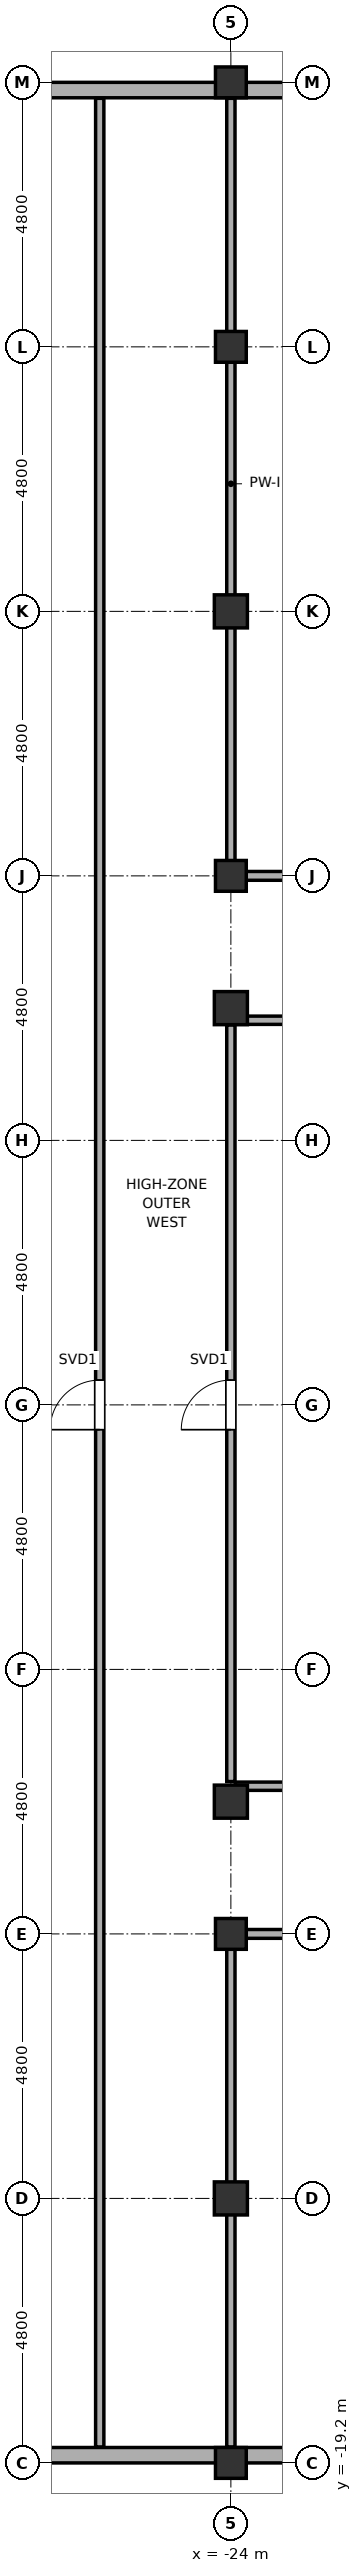
"""IFC4 building model, lengths in metres.
Left out: names, types, materials, properties, quantities, classifications, styles, units other than length and angle.
Written with IfcOpenShell. Run it as: python <this file> out.ifc"""

import sys

from ifc_helpers import new_model, si_unit, direction, frame, frame_2d, origin, origin_2d, place, context, subcontext, project, spatial, rectangle, hollow_rectangle, hollow_circle, extrude, element, fill, save


model = new_model("IFC4")
c1 = context("Model", 3, precision=1e-05, world=origin(), true_north=direction((0.0, 1.0)))
c2 = subcontext(c1, "Body", "Model", "MODEL_VIEW")
j1 = project(units=[si_unit("LENGTHUNIT", "METRE"), si_unit("PLANEANGLEUNIT", "RADIAN")], contexts=[c1])
p1 = place(None, origin())
s1 = spatial("IfcSite", under=j1, at=p1, CompositionType="ELEMENT")
p2 = place(p1, origin())
s2 = spatial("IfcBuilding", under=s1, at=p2, CompositionType="ELEMENT")
p3 = place(p2, frame((0.0, 0.0, 249.25)))
s3 = spatial("IfcBuildingStorey", under=s2, at=p3, CompositionType="ELEMENT", Elevation=249.25)
p4 = place(p3, frame((-24.0, -19.2, 0.0), z_axis=(0.0, 0.0, 1.0), x_axis=(1.0, 0.0, 0.0)))
e1 = element("IfcColumn", 1, at=p4, inside=s3, PredefinedType="COLUMN", context=c2, shape_type="SweptSolid", body=[
    extrude(hollow_circle(Radius=0.28, WallThickness=0.025, at=origin_2d()), origin(), (0.0, 0.0, 1.0), 3.85),
])
p5 = place(p3, frame((-24.0, -14.4, 0.0), z_axis=(0.0, 0.0, 1.0), x_axis=(1.0, 0.0, 0.0)))
e2 = element("IfcColumn", 2, at=p5, inside=s3, PredefinedType="COLUMN", context=c2, shape_type="SweptSolid", body=[
    extrude(hollow_rectangle(XDim=0.6, YDim=0.6, WallThickness=0.028, at=origin_2d()), origin(), (0.0, 0.0, 1.0), 3.85),
])
p6 = place(p3, frame((-24.0, -9.6, 0.0), z_axis=(0.0, 0.0, 1.0), x_axis=(1.0, 0.0, 0.0)))
e3 = element("IfcColumn", 3, at=p6, inside=s3, PredefinedType="COLUMN", context=c2, shape_type="SweptSolid", body=[
    extrude(hollow_circle(Radius=0.28, WallThickness=0.025, at=origin_2d()), origin(), (0.0, 0.0, 1.0), 3.85),
])
for number, where, z_axis, x_axis in (
    (4, (-24.0, -7.2, 0.0), (0.0, 0.0, 1.0), (1.0, 0.0, 0.0)),
    (5, (-24.0, 7.2, 0.0), (0.0, 0.0, 1.0), (1.0, 0.0, 0.0)),
):
    element("IfcColumn", number, at=place(p3, frame(where, z_axis=z_axis, x_axis=x_axis)), inside=s3, PredefinedType="COLUMN", context=c2, shape_type="SweptSolid", body=[
        extrude(hollow_rectangle(XDim=0.6, YDim=0.6, WallThickness=0.028, at=origin_2d()), origin(), (0.0, 0.0, 1.0), 3.85),
    ])
p7 = place(p3, frame((-24.0, 9.6, 0.0), z_axis=(0.0, 0.0, 1.0), x_axis=(1.0, 0.0, 0.0)))
e6 = element("IfcColumn", 6, at=p7, inside=s3, PredefinedType="COLUMN", context=c2, shape_type="SweptSolid", body=[
    extrude(hollow_circle(Radius=0.28, WallThickness=0.025, at=origin_2d()), origin(), (0.0, 0.0, 1.0), 3.85),
])
p8 = place(p3, frame((-24.0, 14.4, 0.0), z_axis=(0.0, 0.0, 1.0), x_axis=(1.0, 0.0, 0.0)))
e7 = element("IfcColumn", 7, at=p8, inside=s3, PredefinedType="COLUMN", context=c2, shape_type="SweptSolid", body=[
    extrude(hollow_rectangle(XDim=0.6, YDim=0.6, WallThickness=0.028, at=origin_2d()), origin(), (0.0, 0.0, 1.0), 3.85),
])
for number, where, z_axis, x_axis in (
    (8, (-24.0, 19.2, 0.0), (0.0, 0.0, 1.0), (1.0, 0.0, 0.0)),
    (9, (-24.0, 24.0, 0.0), (0.0, 0.0, 1.0), (1.0, 0.0, 0.0)),
):
    element("IfcColumn", number, at=place(p3, frame(where, z_axis=z_axis, x_axis=x_axis)), inside=s3, PredefinedType="COLUMN", context=c2, shape_type="SweptSolid", body=[
        extrude(hollow_circle(Radius=0.28, WallThickness=0.025, at=origin_2d()), origin(), (0.0, 0.0, 1.0), 3.85),
    ])
p9 = place(p3, frame((-30.0, -19.06, 0.0), z_axis=(0.0, 0.0, 1.0), x_axis=(1.0, 0.0, 0.0)))
e10 = element("IfcWall", 10, at=p9, inside=s3, PredefinedType="SOLIDWALL", context=c2, shape_type="SweptSolid", body=[
    extrude(rectangle(XDim=25.25, YDim=0.28, at=frame_2d((12.625, 0.0))), origin(), (0.0, 0.0, 1.0), 2.27),
])
p10 = place(p9, frame((7.8, 0.0, 0.75)))
e11 = element("IfcOpeningElement", 11, at=p10, cuts=e10, PredefinedType="OPENING", context=c2, shape_type="SweptSolid", body=[
    extrude(rectangle(XDim=1.2, YDim=1.15, at=frame_2d((0.6, 0.575))), frame((0.0, 0.155, 0.0), z_axis=(0.0, -1.0, 0.0), x_axis=(1.0, 0.0, 0.0)), (0.0, 0.0, 1.0), 0.31),
])
p11 = place(p9, frame((12.6, 0.0, 0.75)))
e12 = element("IfcOpeningElement", 12, at=p11, cuts=e10, PredefinedType="OPENING", context=c2, shape_type="SweptSolid", body=[
    extrude(rectangle(XDim=1.2, YDim=1.15, at=frame_2d((0.6, 0.575))), frame((0.0, 0.155, 0.0), z_axis=(0.0, -1.0, 0.0), x_axis=(1.0, 0.0, 0.0)), (0.0, 0.0, 1.0), 0.31),
])
p12 = place(p9, frame((17.4, 0.0, 0.75)))
e13 = element("IfcOpeningElement", 13, at=p12, cuts=e10, PredefinedType="OPENING", context=c2, shape_type="SweptSolid", body=[
    extrude(rectangle(XDim=1.2, YDim=1.15, at=frame_2d((0.6, 0.575))), frame((0.0, 0.155, 0.0), z_axis=(0.0, -1.0, 0.0), x_axis=(1.0, 0.0, 0.0)), (0.0, 0.0, 1.0), 0.31),
])
p13 = place(p9, frame((22.2, 0.0, 0.75)))
e14 = element("IfcOpeningElement", 14, at=p13, cuts=e10, PredefinedType="OPENING", context=c2, shape_type="SweptSolid", body=[
    extrude(rectangle(XDim=1.2, YDim=1.15, at=frame_2d((0.6, 0.575))), frame((0.0, 0.155, 0.0), z_axis=(0.0, -1.0, 0.0), x_axis=(1.0, 0.0, 0.0)), (0.0, 0.0, 1.0), 0.31),
])
p14 = place(p3, frame((-30.0, 23.86, 0.0), z_axis=(0.0, 0.0, 1.0), x_axis=(1.0, 0.0, 0.0)))
e15 = element("IfcWall", 15, at=p14, inside=s3, PredefinedType="SOLIDWALL", context=c2, shape_type="SweptSolid", body=[
    extrude(rectangle(XDim=25.25, YDim=0.28, at=frame_2d((12.625, 0.0))), origin(), (0.0, 0.0, 1.0), 2.27),
])
p15 = place(p14, frame((7.8, 0.0, 0.75)))
e16 = element("IfcOpeningElement", 16, at=p15, cuts=e15, PredefinedType="OPENING", context=c2, shape_type="SweptSolid", body=[
    extrude(rectangle(XDim=1.2, YDim=1.15, at=frame_2d((0.6, 0.575))), frame((0.0, 0.155, 0.0), z_axis=(0.0, -1.0, 0.0), x_axis=(1.0, 0.0, 0.0)), (0.0, 0.0, 1.0), 0.31),
])
p16 = place(p14, frame((13.8, 0.0, 0.75)))
e17 = element("IfcOpeningElement", 17, at=p16, cuts=e15, PredefinedType="OPENING", context=c2, shape_type="SweptSolid", body=[
    extrude(rectangle(XDim=1.2, YDim=1.15, at=frame_2d((0.6, 0.575))), frame((0.0, 0.155, 0.0), z_axis=(0.0, -1.0, 0.0), x_axis=(1.0, 0.0, 0.0)), (0.0, 0.0, 1.0), 0.31),
])
p17 = place(p14, frame((17.4, 0.0, 0.75)))
e18 = element("IfcOpeningElement", 18, at=p17, cuts=e15, PredefinedType="OPENING", context=c2, shape_type="SweptSolid", body=[
    extrude(rectangle(XDim=1.2, YDim=1.15, at=frame_2d((0.6, 0.575))), frame((0.0, 0.155, 0.0), z_axis=(0.0, -1.0, 0.0), x_axis=(1.0, 0.0, 0.0)), (0.0, 0.0, 1.0), 0.31),
])
p18 = place(p14, frame((22.2, 0.0, 0.75)))
e19 = element("IfcOpeningElement", 19, at=p18, cuts=e15, PredefinedType="OPENING", context=c2, shape_type="SweptSolid", body=[
    extrude(rectangle(XDim=1.2, YDim=1.15, at=frame_2d((0.6, 0.575))), frame((0.0, 0.155, 0.0), z_axis=(0.0, -1.0, 0.0), x_axis=(1.0, 0.0, 0.0)), (0.0, 0.0, 1.0), 0.31),
])
p19 = place(p3, frame((-23.92, -9.6, 0.0), z_axis=(0.0, 0.0, 1.0), x_axis=(1.0, 0.0, 0.0)))
e20 = element("IfcWall", 20, at=p19, inside=s3, PredefinedType="PARTITIONING", context=c2, shape_type="SweptSolid", body=[
    extrude(rectangle(XDim=47.84, YDim=0.16, at=frame_2d((23.92, 0.0))), origin(), (0.0, 0.0, 1.0), 2.27),
])
p20 = place(p19, frame((1.87, 0.0, 0.0)))
e21 = element("IfcOpeningElement", 21, at=p20, cuts=e20, PredefinedType="OPENING", context=c2, shape_type="SweptSolid", body=[
    extrude(rectangle(XDim=0.9, YDim=2.1, at=frame_2d((0.45, 1.05))), frame((0.0, 0.095, 0.0), z_axis=(0.0, -1.0, 0.0), x_axis=(1.0, 0.0, 0.0)), (0.0, 0.0, 1.0), 0.19),
])
p21 = place(p19, frame((45.07, 0.0, 0.0)))
e22 = element("IfcOpeningElement", 22, at=p21, cuts=e20, PredefinedType="OPENING", context=c2, shape_type="SweptSolid", body=[
    extrude(rectangle(XDim=0.9, YDim=2.1, at=frame_2d((0.45, 1.05))), frame((0.0, 0.095, 0.0), z_axis=(0.0, -1.0, 0.0), x_axis=(1.0, 0.0, 0.0)), (0.0, 0.0, 1.0), 0.19),
])
p22 = place(p19, frame((6.67, 0.0, 0.0)))
e23 = element("IfcOpeningElement", 23, at=p22, cuts=e20, PredefinedType="OPENING", context=c2, shape_type="SweptSolid", body=[
    extrude(rectangle(XDim=0.9, YDim=2.1, at=frame_2d((0.45, 1.05))), frame((0.0, 0.095, 0.0), z_axis=(0.0, -1.0, 0.0), x_axis=(1.0, 0.0, 0.0)), (0.0, 0.0, 1.0), 0.19),
])
p23 = place(p19, frame((11.47, 0.0, 0.0)))
e24 = element("IfcOpeningElement", 24, at=p23, cuts=e20, PredefinedType="OPENING", context=c2, shape_type="SweptSolid", body=[
    extrude(rectangle(XDim=0.9, YDim=2.1, at=frame_2d((0.45, 1.05))), frame((0.0, 0.095, 0.0), z_axis=(0.0, -1.0, 0.0), x_axis=(1.0, 0.0, 0.0)), (0.0, 0.0, 1.0), 0.19),
])
p24 = place(p19, frame((16.27, 0.0, 0.0)))
e25 = element("IfcOpeningElement", 25, at=p24, cuts=e20, PredefinedType="OPENING", context=c2, shape_type="SweptSolid", body=[
    extrude(rectangle(XDim=0.9, YDim=2.1, at=frame_2d((0.45, 1.05))), frame((0.0, 0.095, 0.0), z_axis=(0.0, -1.0, 0.0), x_axis=(1.0, 0.0, 0.0)), (0.0, 0.0, 1.0), 0.19),
])
p25 = place(p19, frame((21.07, 0.0, 0.0)))
e26 = element("IfcOpeningElement", 26, at=p25, cuts=e20, PredefinedType="OPENING", context=c2, shape_type="SweptSolid", body=[
    extrude(rectangle(XDim=0.9, YDim=2.1, at=frame_2d((0.45, 1.05))), frame((0.0, 0.095, 0.0), z_axis=(0.0, -1.0, 0.0), x_axis=(1.0, 0.0, 0.0)), (0.0, 0.0, 1.0), 0.19),
])
p26 = place(p19, frame((25.87, 0.0, 0.0)))
e27 = element("IfcOpeningElement", 27, at=p26, cuts=e20, PredefinedType="OPENING", context=c2, shape_type="SweptSolid", body=[
    extrude(rectangle(XDim=0.9, YDim=2.1, at=frame_2d((0.45, 1.05))), frame((0.0, 0.095, 0.0), z_axis=(0.0, -1.0, 0.0), x_axis=(1.0, 0.0, 0.0)), (0.0, 0.0, 1.0), 0.19),
])
p27 = place(p19, frame((30.635, 0.0, 0.0)))
e28 = element("IfcOpeningElement", 28, at=p27, cuts=e20, PredefinedType="OPENING", context=c2, shape_type="SweptSolid", body=[
    extrude(rectangle(XDim=1.05, YDim=2.2, at=frame_2d((0.525, 1.1))), frame((0.0, 0.095, 0.0), z_axis=(0.0, -1.0, 0.0), x_axis=(1.0, 0.0, 0.0)), (0.0, 0.0, 1.0), 0.19),
])
p28 = place(p19, frame((40.83, 0.0, 0.0)))
e29 = element("IfcOpeningElement", 29, at=p28, cuts=e20, PredefinedType="OPENING", context=c2, shape_type="SweptSolid", body=[
    extrude(rectangle(XDim=0.92, YDim=2.15, at=frame_2d((0.46, 1.075))), frame((0.0, 0.095, 0.0), z_axis=(0.0, -1.0, 0.0), x_axis=(1.0, 0.0, 0.0)), (0.0, 0.0, 1.0), 0.19),
])
for number, where, z_axis, x_axis in (
    (30, (-23.92, -6.92, 0.0), (0.0, 0.0, 1.0), (1.0, 0.0, 0.0)),
    (31, (-23.92, 6.98, 0.0), (0.0, 0.0, 1.0), (1.0, 0.0, 0.0)),
):
    element("IfcWall", number, at=place(p3, frame(where, z_axis=z_axis, x_axis=x_axis)), inside=s3, PredefinedType="PARTITIONING", context=c2, shape_type="SweptSolid", body=[
        extrude(rectangle(XDim=9.4, YDim=0.15, at=frame_2d((4.7, 0.0))), origin(), (0.0, 0.0, 1.0), 2.27),
    ])
p29 = place(p3, frame((-23.92, 9.6, 0.0), z_axis=(0.0, 0.0, 1.0), x_axis=(1.0, 0.0, 0.0)))
e32 = element("IfcWall", 32, at=p29, inside=s3, PredefinedType="PARTITIONING", context=c2, shape_type="SweptSolid", body=[
    extrude(rectangle(XDim=47.84, YDim=0.16, at=frame_2d((23.92, 0.0))), origin(), (0.0, 0.0, 1.0), 2.27),
])
p30 = place(p29, frame((1.87, 0.0, 0.0)))
e33 = element("IfcOpeningElement", 33, at=p30, cuts=e32, PredefinedType="OPENING", context=c2, shape_type="SweptSolid", body=[
    extrude(rectangle(XDim=0.9, YDim=2.1, at=frame_2d((0.45, 1.05))), frame((0.0, 0.095, 0.0), z_axis=(0.0, -1.0, 0.0), x_axis=(1.0, 0.0, 0.0)), (0.0, 0.0, 1.0), 0.19),
])
p31 = place(p29, frame((45.07, 0.0, 0.0)))
e34 = element("IfcOpeningElement", 34, at=p31, cuts=e32, PredefinedType="OPENING", context=c2, shape_type="SweptSolid", body=[
    extrude(rectangle(XDim=0.9, YDim=2.1, at=frame_2d((0.45, 1.05))), frame((0.0, 0.095, 0.0), z_axis=(0.0, -1.0, 0.0), x_axis=(1.0, 0.0, 0.0)), (0.0, 0.0, 1.0), 0.19),
])
p32 = place(p29, frame((5.98, 0.0, 0.0)))
e35 = element("IfcOpeningElement", 35, at=p32, cuts=e32, PredefinedType="OPENING", context=c2, shape_type="SweptSolid", body=[
    extrude(rectangle(XDim=0.9, YDim=2.1, at=frame_2d((0.45, 1.05))), frame((0.0, 0.095, 0.0), z_axis=(0.0, -1.0, 0.0), x_axis=(1.0, 0.0, 0.0)), (0.0, 0.0, 1.0), 0.19),
])
p33 = place(p29, frame((7.87, 0.0, 0.0)))
e36 = element("IfcOpeningElement", 36, at=p33, cuts=e32, PredefinedType="OPENING", context=c2, shape_type="SweptSolid", body=[
    extrude(rectangle(XDim=0.9, YDim=2.1, at=frame_2d((0.45, 1.05))), frame((0.0, 0.095, 0.0), z_axis=(0.0, -1.0, 0.0), x_axis=(1.0, 0.0, 0.0)), (0.0, 0.0, 1.0), 0.19),
])
p34 = place(p29, frame((10.395, 0.0, 0.0)))
e37 = element("IfcOpeningElement", 37, at=p34, cuts=e32, PredefinedType="OPENING", context=c2, shape_type="SweptSolid", body=[
    extrude(rectangle(XDim=0.92, YDim=2.15, at=frame_2d((0.46, 1.075))), frame((0.0, 0.095, 0.0), z_axis=(0.0, -1.0, 0.0), x_axis=(1.0, 0.0, 0.0)), (0.0, 0.0, 1.0), 0.19),
])
p35 = place(p29, frame((17.325, 0.0, 0.0)))
e38 = element("IfcOpeningElement", 38, at=p35, cuts=e32, PredefinedType="OPENING", context=c2, shape_type="SweptSolid", body=[
    extrude(rectangle(XDim=0.92, YDim=2.15, at=frame_2d((0.46, 1.075))), frame((0.0, 0.095, 0.0), z_axis=(0.0, -1.0, 0.0), x_axis=(1.0, 0.0, 0.0)), (0.0, 0.0, 1.0), 0.19),
])
p36 = place(p29, frame((19.995, 0.0, 0.0)))
e39 = element("IfcOpeningElement", 39, at=p36, cuts=e32, PredefinedType="OPENING", context=c2, shape_type="SweptSolid", body=[
    extrude(rectangle(XDim=0.92, YDim=2.15, at=frame_2d((0.46, 1.075))), frame((0.0, 0.095, 0.0), z_axis=(0.0, -1.0, 0.0), x_axis=(1.0, 0.0, 0.0)), (0.0, 0.0, 1.0), 0.19),
])
p37 = place(p29, frame((25.87, 0.0, 0.0)))
e40 = element("IfcOpeningElement", 40, at=p37, cuts=e32, PredefinedType="OPENING", context=c2, shape_type="SweptSolid", body=[
    extrude(rectangle(XDim=0.9, YDim=2.1, at=frame_2d((0.45, 1.05))), frame((0.0, 0.095, 0.0), z_axis=(0.0, -1.0, 0.0), x_axis=(1.0, 0.0, 0.0)), (0.0, 0.0, 1.0), 0.19),
])
p38 = place(p29, frame((40.83, 0.0, 0.0)))
e41 = element("IfcOpeningElement", 41, at=p38, cuts=e32, PredefinedType="OPENING", context=c2, shape_type="SweptSolid", body=[
    extrude(rectangle(XDim=0.92, YDim=2.15, at=frame_2d((0.46, 1.075))), frame((0.0, 0.095, 0.0), z_axis=(0.0, -1.0, 0.0), x_axis=(1.0, 0.0, 0.0)), (0.0, 0.0, 1.0), 0.19),
])
p39 = place(p3, frame((-26.38, -18.91, 0.0), z_axis=(0.0, 0.0, 1.0), x_axis=(0.0, 1.0, 0.0)))
e42 = element("IfcWall", 42, at=p39, inside=s3, PredefinedType="PARTITIONING", context=c2, shape_type="SweptSolid", body=[
    extrude(rectangle(XDim=42.62, YDim=0.15, at=frame_2d((21.31, 0.0))), origin(), (0.0, 0.0, 1.0), 2.27),
])
p40 = place(p39, frame((18.46, 0.0, 0.0)))
e43 = element("IfcOpeningElement", 43, at=p40, cuts=e42, PredefinedType="OPENING", context=c2, shape_type="SweptSolid", body=[
    extrude(rectangle(XDim=0.9, YDim=2.1, at=frame_2d((0.45, 1.05))), frame((0.0, 0.09, 0.0), z_axis=(0.0, -1.0, 0.0), x_axis=(1.0, 0.0, 0.0)), (0.0, 0.0, 1.0), 0.18),
])
p41 = place(p3, frame((-24.0, -18.91, 0.0), z_axis=(0.0, 0.0, 1.0), x_axis=(0.0, 1.0, 0.0)))
e44 = element("IfcWall", 44, at=p41, inside=s3, PredefinedType="PARTITIONING", context=c2, shape_type="SweptSolid", body=[
    extrude(rectangle(XDim=9.19, YDim=0.15, at=frame_2d((4.595, 0.0))), origin(), (0.0, 0.0, 1.0), 2.27),
])
p42 = place(p3, frame((-24.0, -6.835, 0.0), z_axis=(0.0, 0.0, 1.0), x_axis=(0.0, 1.0, 0.0)))
e45 = element("IfcWall", 45, at=p42, inside=s3, PredefinedType="PARTITIONING", context=c2, shape_type="SweptSolid", body=[
    extrude(rectangle(XDim=13.73, YDim=0.15, at=frame_2d((6.865, 0.0))), origin(), (0.0, 0.0, 1.0), 2.27),
])
p43 = place(p42, frame((6.385, 0.0, 0.0)))
e46 = element("IfcOpeningElement", 46, at=p43, cuts=e45, PredefinedType="OPENING", context=c2, shape_type="SweptSolid", body=[
    extrude(rectangle(XDim=0.9, YDim=2.1, at=frame_2d((0.45, 1.05))), frame((0.0, 0.09, 0.0), z_axis=(0.0, -1.0, 0.0), x_axis=(1.0, 0.0, 0.0)), (0.0, 0.0, 1.0), 0.18),
])
p44 = place(p3, frame((-24.0, 9.72, 0.0), z_axis=(0.0, 0.0, 1.0), x_axis=(0.0, 1.0, 0.0)))
e47 = element("IfcWall", 47, at=p44, inside=s3, PredefinedType="PARTITIONING", context=c2, shape_type="SweptSolid", body=[
    extrude(rectangle(XDim=13.99, YDim=0.15, at=frame_2d((6.995, 0.0))), origin(), (0.0, 0.0, 1.0), 2.27),
])
p45 = place(p43, origin())
e48 = element("IfcDoor", 48, at=p45, inside=s3, OperationType="SINGLE_SWING_LEFT", PredefinedType="DOOR", context=c2, shape_type="SweptSolid", body=[
    extrude(rectangle(XDim=0.9, YDim=2.1, at=frame_2d((0.45, 1.05))), frame((0.0, 0.025, 0.0), z_axis=(0.0, -1.0, 0.0), x_axis=(1.0, 0.0, 0.0)), (0.0, 0.0, 1.0), 0.05),
])
fill(e46, e48)
p46 = place(p40, origin())
e49 = element("IfcDoor", 49, at=p46, inside=s3, OperationType="SINGLE_SWING_RIGHT", PredefinedType="DOOR", context=c2, shape_type="SweptSolid", body=[
    extrude(rectangle(XDim=0.9, YDim=2.1, at=frame_2d((0.45, 1.05))), frame((0.0, 0.025, 0.0), z_axis=(0.0, -1.0, 0.0), x_axis=(1.0, 0.0, 0.0)), (0.0, 0.0, 1.0), 0.05),
])
fill(e43, e49)
save(model, sys.argv[1])
